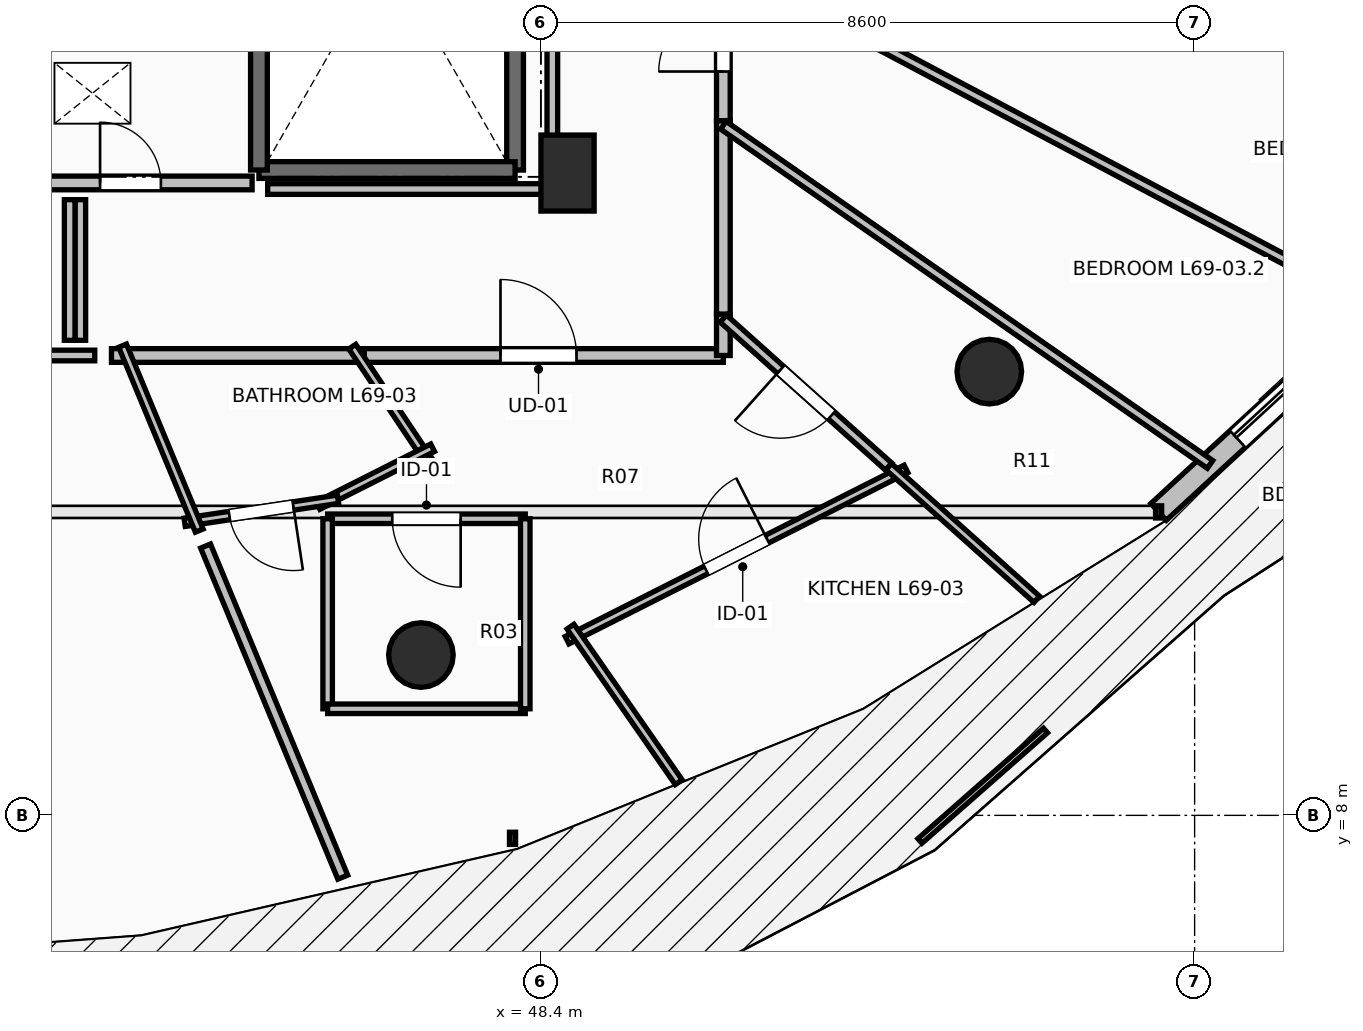
"""IFC4 building model, lengths in metres.
Left out: names, types, materials, properties, quantities, classifications, styles, units other than length and angle.
Written with IfcOpenShell. Run it as: python <this file> out.ifc"""

import sys

from ifc_helpers import new_model, si_unit, direction, frame, frame_2d, origin, origin_2d, place, context, subcontext, project, spatial, rectangle, circle, extrude, element, fill, save


model = new_model("IFC4")
c1 = context("Model", 3, precision=1e-05, world=origin(), true_north=direction((0.0, 1.0)))
c2 = subcontext(c1, "Body", "Model", "MODEL_VIEW")
j1 = project(units=[si_unit("LENGTHUNIT", "METRE"), si_unit("PLANEANGLEUNIT", "RADIAN")], contexts=[c1])
p1 = place(None, origin())
s1 = spatial("IfcSite", under=j1, at=p1, CompositionType="ELEMENT")
p2 = place(p1, origin())
s2 = spatial("IfcBuilding", under=s1, at=p2, CompositionType="ELEMENT")
p3 = place(p2, frame((0.0, 0.0, 255.55)))
s3 = spatial("IfcBuildingStorey", under=s2, at=p3, CompositionType="ELEMENT", Elevation=255.55)
for number, where, z_axis, x_axis in (
    (1, (46.821, 10.109, 0.0), (0.0, 0.0, 1.0), (0.383, -0.924, 0.0)),
    (2, (54.299, 13.838, 0.0), (0.0, 0.0, 1.0), (0.707, -0.707, 0.0)),
):
    element("IfcColumn", number, at=place(p3, frame(where, z_axis=z_axis, x_axis=x_axis)), inside=s3, PredefinedType="COLUMN", context=c2, shape_type="SweptSolid", body=[
        extrude(circle(Radius=0.425, at=origin_2d()), origin(), (0.0, 0.0, 1.0), 3.55),
    ])
p4 = place(p3, frame((48.75, 16.45, 0.0), z_axis=(0.0, 0.0, 1.0), x_axis=(1.0, 0.0, 0.0)))
e3 = element("IfcColumn", 3, at=p4, inside=s3, PredefinedType="PILASTER", context=c2, shape_type="SweptSolid", body=[
    extrude(rectangle(XDim=0.7, YDim=1.0, at=origin_2d()), origin(), (0.0, 0.0, 1.0), 3.55),
])
p5 = place(p3, frame((56.526, 11.992, 0.0), z_axis=(0.0, 0.0, 1.0), x_axis=(0.735445373611, 0.677584018727, 0.0)))
e4 = element("IfcWall", 4, at=p5, inside=s3, PredefinedType="STANDARD", context=c2, shape_type="SweptSolid", body=[
    extrude(rectangle(XDim=4.43, YDim=0.3, at=frame_2d((2.215, 0.0))), origin(), (0.0, 0.0, 1.0), 3.29),
])
p6 = place(p5, frame((1.415, 0.0, 0.0)))
e5 = element("IfcOpeningElement", 5, at=p6, cuts=e4, PredefinedType="OPENING", context=c2, shape_type="SweptSolid", body=[
    extrude(rectangle(XDim=1.6, YDim=2.3, at=frame_2d((0.8, 1.15))), frame((0.0, 0.165, 0.0), z_axis=(0.0, -1.0, 0.0), x_axis=(1.0, 0.0, 0.0)), (0.0, 0.0, 1.0), 0.33),
])
p7 = place(p3, frame((48.06, 23.91, 0.0), z_axis=(0.0, 0.0, 1.0), x_axis=(0.0, -1.0, 0.0)))
e6 = element("IfcWall", 6, at=p7, inside=s3, PredefinedType="SOLIDWALL", context=c2, shape_type="SweptSolid", body=[
    extrude(rectangle(XDim=7.42, YDim=0.22, at=frame_2d((3.71, 0.0))), origin(), (0.0, 0.0, 1.0), 3.29),
])
p8 = place(p3, frame((48.06, 16.49, 0.0), z_axis=(0.0, 0.0, 1.0), x_axis=(-1.0, 0.0, 0.0)))
e7 = element("IfcWall", 7, at=p8, inside=s3, PredefinedType="SOLIDWALL", context=c2, shape_type="SweptSolid", body=[
    extrude(rectangle(XDim=3.37, YDim=0.22, at=frame_2d((1.685, 0.0))), origin(), (0.0, 0.0, 1.0), 3.29),
])
p9 = place(p3, frame((44.69, 16.49, 0.0), z_axis=(0.0, 0.0, 1.0), x_axis=(0.0, 1.0, 0.0)))
e8 = element("IfcWall", 8, at=p9, inside=s3, PredefinedType="SOLIDWALL", context=c2, shape_type="SweptSolid", body=[
    extrude(rectangle(XDim=7.42, YDim=0.22, at=frame_2d((3.71, 0.0))), origin(), (0.0, 0.0, 1.0), 3.29),
])
p10 = place(p3, frame((41.4, 16.32, 0.0), z_axis=(0.0, 0.0, 1.0), x_axis=(1.0, 0.0, 0.0)))
e9 = element("IfcWall", 9, at=p10, inside=s3, PredefinedType="PARTITIONING", context=c2, shape_type="SweptSolid", body=[
    extrude(rectangle(XDim=3.2, YDim=0.18, at=frame_2d((1.6, 0.0))), origin(), (0.0, 0.0, 1.0), 3.29),
])
p11 = place(p10, frame((1.2, 0.0, 0.0)))
e10 = element("IfcOpeningElement", 10, at=p11, cuts=e9, PredefinedType="OPENING", context=c2, shape_type="SweptSolid", body=[
    extrude(rectangle(XDim=0.8, YDim=2.05, at=frame_2d((0.4, 1.025))), frame((0.0, 0.105, 0.0), z_axis=(0.0, -1.0, 0.0), x_axis=(1.0, 0.0, 0.0)), (0.0, 0.0, 1.0), 0.21),
])
p12 = place(p3, frame((45.936, 14.05, 0.0), z_axis=(0.0, 0.0, 1.0), x_axis=(1.0, 0.0, 0.0)))
e11 = element("IfcWall", 11, at=p12, inside=s3, PredefinedType="PARTITIONING", context=c2, shape_type="SweptSolid", body=[
    extrude(rectangle(XDim=4.864, YDim=0.18, at=frame_2d((2.432, 0.0))), origin(), (0.0, 0.0, 1.0), 2.482),
])
p13 = place(p12, frame((1.932, 0.0, 0.0)))
e12 = element("IfcOpeningElement", 12, at=p13, cuts=e11, PredefinedType="OPENING", context=c2, shape_type="SweptSolid", body=[
    extrude(rectangle(XDim=1.0, YDim=2.15, at=frame_2d((0.5, 1.075))), frame((0.0, 0.105, 0.0), z_axis=(0.0, -1.0, 0.0), x_axis=(1.0, 0.0, 0.0)), (0.0, 0.0, 1.0), 0.21),
])
p14 = place(p3, frame((50.8, 14.05, 0.0), z_axis=(0.0, 0.0, 1.0), x_axis=(0.0, 1.0, 0.0)))
e13 = element("IfcWall", 13, at=p14, inside=s3, PredefinedType="PARTITIONING", context=c2, shape_type="SweptSolid", body=[
    extrude(rectangle(XDim=0.545, YDim=0.18, at=frame_2d((0.272, 0.0))), origin(), (0.0, 0.0, 1.0), 3.022),
])
p15 = place(p3, frame((42.75, 14.05, 0.0), z_axis=(0.0, 0.0, 1.0), x_axis=(1.0, 0.0, 0.0)))
e14 = element("IfcWall", 14, at=p15, inside=s3, PredefinedType="PARTITIONING", context=c2, shape_type="SweptSolid", body=[
    extrude(rectangle(XDim=3.326, YDim=0.18, at=frame_2d((1.663, 0.0))), origin(), (0.0, 0.0, 1.0), 2.482),
])
p16 = place(p3, frame((50.8, 14.595, 0.0), z_axis=(0.0, 0.0, 1.0), x_axis=(0.0, 1.0, 0.0)))
e15 = element("IfcWall", 15, at=p16, inside=s3, PredefinedType="PARTITIONING", context=c2, shape_type="SweptSolid", body=[
    extrude(rectangle(XDim=2.544, YDim=0.18, at=frame_2d((1.272, 0.0))), origin(), (0.0, 0.0, 1.0), 2.482),
])
p17 = place(p3, frame((50.8, 17.139, 0.0), z_axis=(0.0, 0.0, 1.0), x_axis=(0.0, 1.0, 0.0)))
e16 = element("IfcWall", 16, at=p17, inside=s3, PredefinedType="PARTITIONING", context=c2, shape_type="SweptSolid", body=[
    extrude(rectangle(XDim=2.144, YDim=0.18, at=frame_2d((1.072, 0.0))), origin(), (0.0, 0.0, 1.0), 3.29),
])
p18 = place(p17, frame((0.647, 0.0, 0.0)))
e17 = element("IfcOpeningElement", 17, at=p18, cuts=e16, PredefinedType="OPENING", context=c2, shape_type="SweptSolid", body=[
    extrude(rectangle(XDim=0.85, YDim=2.1, at=frame_2d((0.425, 1.05))), frame((0.0, 0.105, 0.0), z_axis=(0.0, -1.0, 0.0), x_axis=(1.0, 0.0, 0.0)), (0.0, 0.0, 1.0), 0.21),
])
p19 = place(p3, frame((45.918, 14.167, 0.0), z_axis=(0.0, 0.0, 1.0), x_axis=(0.555785343288, -0.831325839961, 0.0)))
e18 = element("IfcWall", 18, at=p19, inside=s3, PredefinedType="PARTITIONING", context=c2, shape_type="SweptSolid", body=[
    extrude(rectangle(XDim=1.816, YDim=0.11, at=frame_2d((0.908, 0.0))), origin(), (0.0, 0.0, 1.0), 2.482),
])
p20 = place(p3, frame((46.975, 12.836, 0.0), z_axis=(0.0, 0.0, 1.0), x_axis=(-0.892715322691, -0.450621074332, 0.0)))
e19 = element("IfcWall", 19, at=p20, inside=s3, PredefinedType="PARTITIONING", context=c2, shape_type="SweptSolid", body=[
    extrude(rectangle(XDim=1.689, YDim=0.11, at=frame_2d((0.845, 0.0))), origin(), (0.0, 0.0, 1.0), 3.29),
])
p21 = place(p3, frame((45.73, 12.159, 0.0), z_axis=(0.0, 0.0, 1.0), x_axis=(-0.98887923552, -0.148720736812, 0.0)))
e20 = element("IfcWall", 20, at=p21, inside=s3, PredefinedType="PARTITIONING", context=c2, shape_type="SweptSolid", body=[
    extrude(rectangle(XDim=2.041, YDim=0.11, at=frame_2d((1.02, 0.0))), origin(), (0.0, 0.0, 1.0), 3.29),
])
p22 = place(p21, frame((0.595, 0.0, 0.0)))
e21 = element("IfcOpeningElement", 21, at=p22, cuts=e20, PredefinedType="OPENING", context=c2, shape_type="SweptSolid", body=[
    extrude(rectangle(XDim=0.85, YDim=2.1, at=frame_2d((0.425, 1.05))), frame((0.0, 0.07, 0.0), z_axis=(0.0, -1.0, 0.0), x_axis=(1.0, 0.0, 0.0)), (0.0, 0.0, 1.0), 0.14),
])
p23 = place(p3, frame((43.905, 11.747, 0.0), z_axis=(0.0, 0.0, 1.0), x_axis=(-0.38282398209, 0.923821302383, 0.0)))
e22 = element("IfcWall", 22, at=p23, inside=s3, PredefinedType="PARTITIONING", context=c2, shape_type="SweptSolid", body=[
    extrude(rectangle(XDim=2.633, YDim=0.11, at=frame_2d((1.317, 0.0))), origin(), (0.0, 0.0, 1.0), 2.482),
])
p24 = place(p3, frame((48.744, 10.305, 0.0), z_axis=(0.0, 0.0, 1.0), x_axis=(0.892523078089, 0.45100172403, 0.0)))
e23 = element("IfcWall", 23, at=p24, inside=s3, PredefinedType="PARTITIONING", context=c2, shape_type="SweptSolid", body=[
    extrude(rectangle(XDim=4.996, YDim=0.11, at=frame_2d((2.498, 0.0))), origin(), (0.0, 0.0, 1.0), 3.29),
])
p25 = place(p24, frame((2.048, 0.0, 0.0)))
e24 = element("IfcOpeningElement", 24, at=p25, cuts=e23, PredefinedType="OPENING", context=c2, shape_type="SweptSolid", body=[
    extrude(rectangle(XDim=0.9, YDim=2.1, at=frame_2d((0.45, 1.05))), frame((0.0, 0.07, 0.0), z_axis=(0.0, -1.0, 0.0), x_axis=(1.0, 0.0, 0.0)), (0.0, 0.0, 1.0), 0.14),
])
p26 = place(p3, frame((52.974, 12.588, 0.0), z_axis=(0.0, 0.0, 1.0), x_axis=(0.744980199756, -0.667086577568, 0.0)))
e25 = element("IfcWall", 25, at=p26, inside=s3, PredefinedType="PARTITIONING", context=c2, shape_type="SweptSolid", body=[
    extrude(rectangle(XDim=2.617, YDim=0.11, at=frame_2d((1.309, 0.0))), origin(), (0.0, 0.0, 1.0), 3.29),
])
p27 = place(p3, frame((50.213, 8.436, 0.0), z_axis=(0.0, 0.0, 1.0), x_axis=(-0.571041537148, 0.820921167258, 0.0)))
e26 = element("IfcWall", 26, at=p27, inside=s3, PredefinedType="PARTITIONING", context=c2, shape_type="SweptSolid", body=[
    extrude(rectangle(XDim=2.493, YDim=0.11, at=frame_2d((1.247, 0.0))), origin(), (0.0, 0.0, 1.0), 3.29),
])
p28 = place(p3, frame((48.194, 11.902, 0.0), z_axis=(0.0, 0.0, 1.0), x_axis=(-1.0, 0.0, 0.0)))
e27 = element("IfcWall", 27, at=p28, inside=s3, PredefinedType="PARTITIONING", context=c2, shape_type="SweptSolid", body=[
    extrude(rectangle(XDim=2.6, YDim=0.125, at=frame_2d((1.3, 0.0))), origin(), (0.0, 0.0, 1.0), 2.482),
])
p29 = place(p28, frame((0.85, 0.0, 0.0)))
e28 = element("IfcOpeningElement", 28, at=p29, cuts=e27, PredefinedType="OPENING", context=c2, shape_type="SweptSolid", body=[
    extrude(rectangle(XDim=0.9, YDim=2.1, at=frame_2d((0.45, 1.05))), frame((0.0, 0.077, 0.0), z_axis=(0.0, -1.0, 0.0), x_axis=(1.0, 0.0, 0.0)), (0.0, 0.0, 1.0), 0.155),
])
p30 = place(p3, frame((45.594, 11.902, 0.0), z_axis=(0.0, 0.0, 1.0), x_axis=(0.0, -1.0, 0.0)))
e29 = element("IfcWall", 29, at=p30, inside=s3, PredefinedType="PARTITIONING", context=c2, shape_type="SweptSolid", body=[
    extrude(rectangle(XDim=2.5, YDim=0.125, at=frame_2d((1.25, 0.0))), origin(), (0.0, 0.0, 1.0), 2.874),
])
p31 = place(p3, frame((45.594, 9.402, 0.0), z_axis=(0.0, 0.0, 1.0), x_axis=(1.0, 0.0, 0.0)))
e30 = element("IfcWall", 30, at=p31, inside=s3, PredefinedType="PARTITIONING", context=c2, shape_type="SweptSolid", body=[
    extrude(rectangle(XDim=2.6, YDim=0.125, at=frame_2d((1.3, 0.0))), origin(), (0.0, 0.0, 1.0), 3.29),
])
p32 = place(p3, frame((48.194, 9.402, 0.0), z_axis=(0.0, 0.0, 1.0), x_axis=(0.0, 1.0, 0.0)))
e31 = element("IfcWall", 31, at=p32, inside=s3, PredefinedType="PARTITIONING", context=c2, shape_type="SweptSolid", body=[
    extrude(rectangle(XDim=2.5, YDim=0.125, at=frame_2d((1.25, 0.0))), origin(), (0.0, 0.0, 1.0), 2.874),
])
p33 = place(p3, frame((52.974, 12.588, 0.0), z_axis=(0.0, 0.0, 1.0), x_axis=(-0.744943619707, 0.667127426702, 0.0)))
e32 = element("IfcWall", 32, at=p33, inside=s3, PredefinedType="PARTITIONING", context=c2, shape_type="SweptSolid", body=[
    extrude(rectangle(XDim=2.918, YDim=0.125, at=frame_2d((1.459, 0.0))), origin(), (0.0, 0.0, 1.0), 2.874),
])
p34 = place(p33, frame((1.009, 0.0, 0.0)))
e33 = element("IfcOpeningElement", 33, at=p34, cuts=e32, PredefinedType="OPENING", context=c2, shape_type="SweptSolid", body=[
    extrude(rectangle(XDim=0.9, YDim=2.1, at=frame_2d((0.45, 1.05))), frame((0.0, 0.077, 0.0), z_axis=(0.0, -1.0, 0.0), x_axis=(1.0, 0.0, 0.0)), (0.0, 0.0, 1.0), 0.155),
])
p35 = place(p3, frame((57.203, 12.617, 0.0), z_axis=(0.0, 0.0, 1.0), x_axis=(-0.820423513177, 0.571756293386, 0.0)))
e34 = element("IfcWall", 34, at=p35, inside=s3, PredefinedType="PARTITIONING", context=c2, shape_type="SweptSolid", body=[
    extrude(rectangle(XDim=7.804, YDim=0.125, at=frame_2d((3.902, 0.0))), origin(), (0.0, 0.0, 1.0), 2.874),
])
p36 = place(p3, frame((59.417, 14.66, 0.0), z_axis=(0.0, 0.0, 1.0), x_axis=(-0.883742233358, 0.467974000325, 0.0)))
e35 = element("IfcWall", 35, at=p36, inside=s3, PredefinedType="PARTITIONING", context=c2, shape_type="SweptSolid", body=[
    extrude(rectangle(XDim=9.75, YDim=0.125, at=frame_2d((4.875, 0.0))), origin(), (0.0, 0.0, 1.0), 2.874),
])
p37 = place(p3, frame((61.271, 17.102, 0.0), z_axis=(0.0, 0.0, 1.0), x_axis=(-0.934042646632, 0.357161496066, 0.0)))
e36 = element("IfcWall", 36, at=p37, inside=s3, PredefinedType="PARTITIONING", context=c2, shape_type="SweptSolid", body=[
    extrude(rectangle(XDim=11.21, YDim=0.125, at=frame_2d((5.605, 0.0))), origin(), (0.0, 0.0, 1.0), 2.874),
])
p38 = place(p3, frame((39.45, 14.05, 0.0), z_axis=(0.0, 0.0, 1.0), x_axis=(1.0, 0.0, 0.0)))
e37 = element("IfcWall", 37, at=p38, inside=s3, PredefinedType="PARTITIONING", context=c2, shape_type="SweptSolid", body=[
    extrude(rectangle(XDim=3.08, YDim=0.14, at=frame_2d((1.54, 0.0))), origin(), (0.0, 0.0, 1.0), 2.936),
])
p39 = place(p3, frame((42.34, 14.25, 0.0), z_axis=(0.0, 0.0, 1.0), x_axis=(0.0, 1.0, 0.0)))
e38 = element("IfcWall", 38, at=p39, inside=s3, PredefinedType="PARTITIONING", context=c2, shape_type="SweptSolid", body=[
    extrude(rectangle(XDim=1.85, YDim=0.14, at=frame_2d((0.925, 0.0))), origin(), (0.0, 0.0, 1.0), 3.29),
])
p40 = place(p3, frame((44.805, 16.24, 0.0), z_axis=(0.0, 0.0, 1.0), x_axis=(1.0, 0.0, 0.0)))
e39 = element("IfcWall", 39, at=p40, inside=s3, PredefinedType="PARTITIONING", context=c2, shape_type="SweptSolid", body=[
    extrude(rectangle(XDim=3.745, YDim=0.14, at=frame_2d((1.873, 0.0))), origin(), (0.0, 0.0, 1.0), 2.482),
])
p41 = place(p3, frame((48.55, 16.24, 0.0), z_axis=(0.0, 0.0, 1.0), x_axis=(0.0, 1.0, 0.0)))
e40 = element("IfcWall", 40, at=p41, inside=s3, PredefinedType="PARTITIONING", context=c2, shape_type="SweptSolid", body=[
    extrude(rectangle(XDim=7.514, YDim=0.14, at=frame_2d((3.757, 0.0))), origin(), (0.0, 0.0, 1.0), 2.482),
])
p42 = place(p3, frame((42.2, 16.1, 0.0), z_axis=(0.0, 0.0, 1.0), x_axis=(0.0, -1.0, 0.0)))
e41 = element("IfcWall", 41, at=p42, inside=s3, PredefinedType="PARTITIONING", context=c2, shape_type="SweptSolid", body=[
    extrude(rectangle(XDim=1.85, YDim=0.14, at=frame_2d((0.925, 0.0))), origin(), (0.0, 0.0, 1.0), 3.29),
])
p43 = place(p3, frame((43.988, 11.543, 0.0), z_axis=(0.0, 0.0, 1.0), x_axis=(0.382798409849, -0.923831898895, 0.0)))
e42 = element("IfcWall", 42, at=p43, inside=s3, PredefinedType="PARTITIONING", context=c2, shape_type="SweptSolid", body=[
    extrude(rectangle(XDim=4.715, YDim=0.14, at=frame_2d((2.357, 0.0))), origin(), (0.0, 0.0, 1.0), 2.874),
])
p44 = place(p6, origin())
e43 = element("IfcDoor", 43, at=p44, inside=s3, OperationType="SLIDING_TO_LEFT", PredefinedType="DOOR", context=c2, shape_type="SweptSolid", body=[
    extrude(rectangle(XDim=1.6, YDim=2.3, at=frame_2d((0.8, 1.15))), frame((0.0, 0.025, 0.0), z_axis=(0.0, -1.0, 0.0), x_axis=(1.0, 0.0, 0.0)), (0.0, 0.0, 1.0), 0.05),
])
fill(e5, e43)
p45 = place(p11, origin())
e44 = element("IfcDoor", 44, at=p45, inside=s3, OperationType="SINGLE_SWING_LEFT", PredefinedType="DOOR", context=c2, shape_type="SweptSolid", body=[
    extrude(rectangle(XDim=0.8, YDim=2.05, at=frame_2d((0.4, 1.025))), frame((0.0, 0.025, 0.0), z_axis=(0.0, -1.0, 0.0), x_axis=(1.0, 0.0, 0.0)), (0.0, 0.0, 1.0), 0.05),
])
fill(e10, e44)
p46 = place(p13, origin())
e45 = element("IfcDoor", 45, at=p46, inside=s3, OperationType="SINGLE_SWING_LEFT", PredefinedType="DOOR", context=c2, shape_type="SweptSolid", body=[
    extrude(rectangle(XDim=1.0, YDim=2.15, at=frame_2d((0.5, 1.075))), frame((0.0, 0.025, 0.0), z_axis=(0.0, -1.0, 0.0), x_axis=(1.0, 0.0, 0.0)), (0.0, 0.0, 1.0), 0.05),
])
fill(e12, e45)
p47 = place(p22, origin())
e46 = element("IfcDoor", 46, at=p47, inside=s3, OperationType="SINGLE_SWING_LEFT", PredefinedType="DOOR", context=c2, shape_type="SweptSolid", body=[
    extrude(rectangle(XDim=0.85, YDim=2.1, at=frame_2d((0.425, 1.05))), frame((0.0, 0.025, 0.0), z_axis=(0.0, -1.0, 0.0), x_axis=(1.0, 0.0, 0.0)), (0.0, 0.0, 1.0), 0.05),
])
fill(e21, e46)
p48 = place(p25, origin())
e47 = element("IfcDoor", 47, at=p48, inside=s3, OperationType="SINGLE_SWING_RIGHT", PredefinedType="DOOR", context=c2, shape_type="SweptSolid", body=[
    extrude(rectangle(XDim=0.9, YDim=2.1, at=frame_2d((0.45, 1.05))), frame((0.0, 0.025, 0.0), z_axis=(0.0, -1.0, 0.0), x_axis=(1.0, 0.0, 0.0)), (0.0, 0.0, 1.0), 0.05),
])
fill(e24, e47)
p49 = place(p29, origin())
e48 = element("IfcDoor", 48, at=p49, inside=s3, OperationType="SINGLE_SWING_LEFT", PredefinedType="DOOR", context=c2, shape_type="SweptSolid", body=[
    extrude(rectangle(XDim=0.9, YDim=2.1, at=frame_2d((0.45, 1.05))), frame((0.0, 0.025, 0.0), z_axis=(0.0, -1.0, 0.0), x_axis=(1.0, 0.0, 0.0)), (0.0, 0.0, 1.0), 0.05),
])
fill(e28, e48)
p50 = place(p34, origin())
e49 = element("IfcDoor", 49, at=p50, inside=s3, OperationType="SINGLE_SWING_RIGHT", PredefinedType="DOOR", context=c2, shape_type="SweptSolid", body=[
    extrude(rectangle(XDim=0.9, YDim=2.1, at=frame_2d((0.45, 1.05))), frame((0.0, 0.025, 0.0), z_axis=(0.0, -1.0, 0.0), x_axis=(1.0, 0.0, 0.0)), (0.0, 0.0, 1.0), 0.05),
])
fill(e33, e49)
p51 = place(p18, origin())
e50 = element("IfcDoor", 50, at=p51, inside=s3, OperationType="SINGLE_SWING_LEFT", PredefinedType="DOOR", context=c2, shape_type="SweptSolid", body=[
    extrude(rectangle(XDim=0.85, YDim=2.1, at=frame_2d((0.425, 1.05))), frame((0.0, 0.025, 0.0), z_axis=(0.0, -1.0, 0.0), x_axis=(1.0, 0.0, 0.0)), (0.0, 0.0, 1.0), 0.05),
])
fill(e17, e50)
save(model, sys.argv[1])
